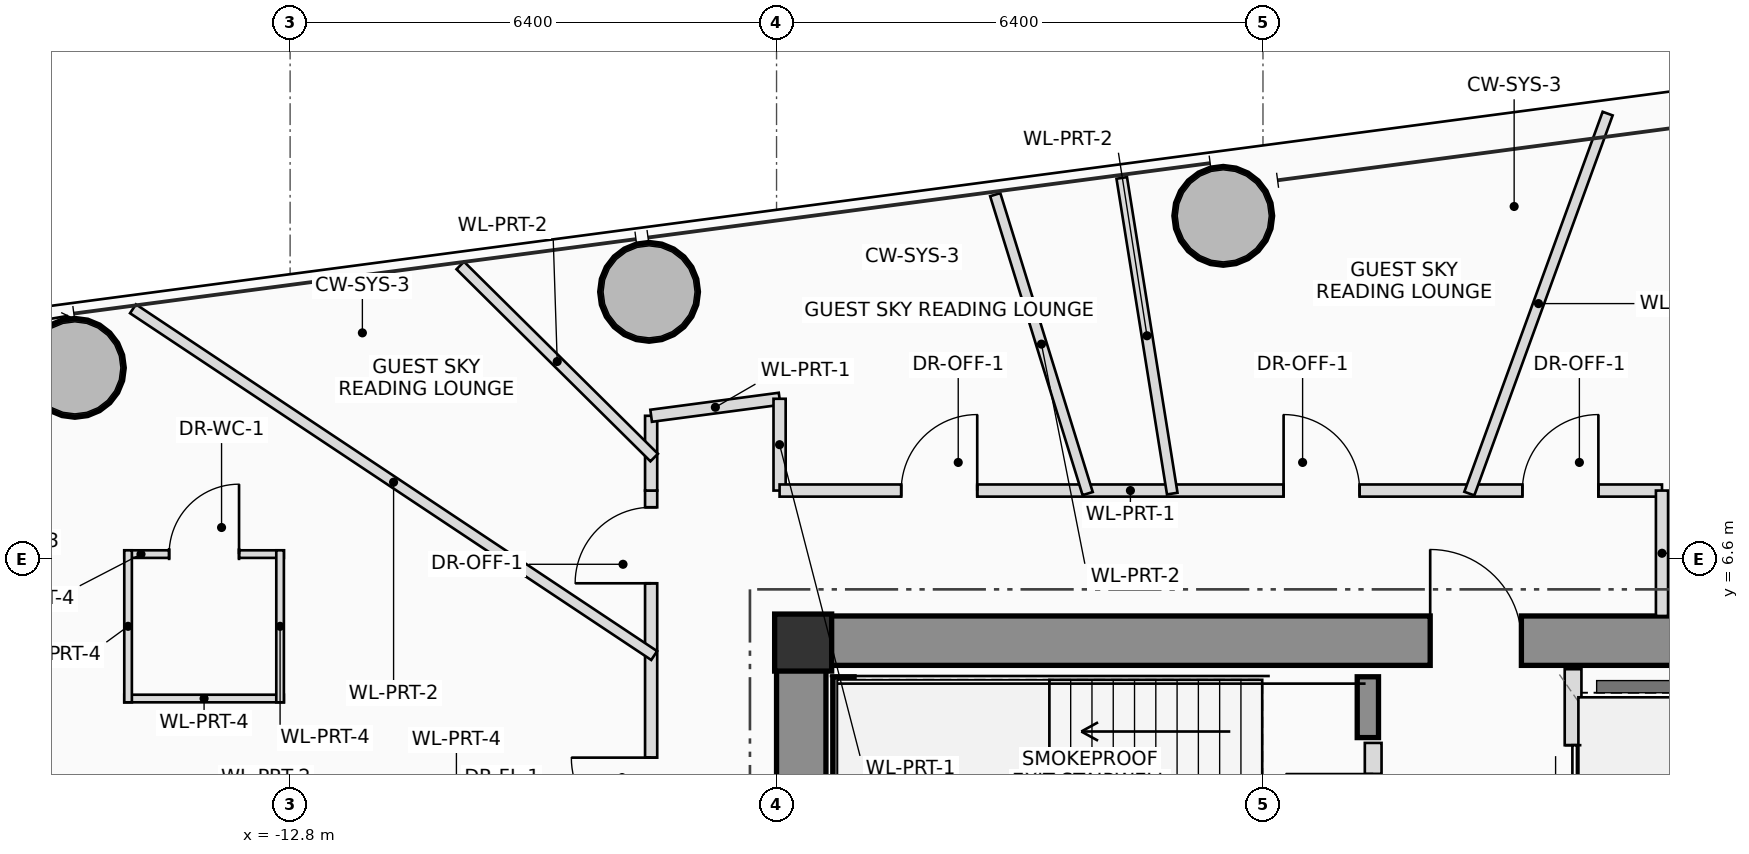
"""IFC4 building model, lengths in metres.
Left out: names, types, materials, properties, quantities, classifications, styles, units other than length and angle.
Written with IfcOpenShell. Run it as: python <this file> out.ifc"""

import sys

from ifc_helpers import new_model, si_unit, direction, frame, frame_2d, origin, origin_2d, place, context, subcontext, project, spatial, rectangle, hollow_circle, extrude, source, transform, mapped, element, fill, save


model = new_model("IFC4")
c1 = context("Model", 3, precision=1e-05, world=origin(), true_north=direction((0.0, 1.0)))
c2 = subcontext(c1, "Body", "Model", "MODEL_VIEW")
j1 = project(units=[si_unit("LENGTHUNIT", "METRE"), si_unit("PLANEANGLEUNIT", "RADIAN")], contexts=[c1])
p1 = place(None, origin())
s1 = spatial("IfcSite", under=j1, at=p1, CompositionType="ELEMENT")
p2 = place(p1, origin())
s2 = spatial("IfcBuilding", under=s1, at=p2, CompositionType="ELEMENT")
p3 = place(p2, frame((0.0, 0.0, 165.65)))
s3 = spatial("IfcBuildingStorey", under=s2, at=p3, CompositionType="ELEMENT", Elevation=165.65)
m1 = source(origin(), c2, "Body", "SweptSolid", [
    extrude(rectangle(XDim=0.75, YDim=0.75, at=origin_2d()), origin(), (0.0, 0.0, 1.0), 3.45),
])
p4 = place(p3, frame((-6.05, 5.5, 0.0), z_axis=(0.0, 0.0, 1.0), x_axis=(1.0, 0.0, 0.0)))
e1 = element("IfcColumn", 1, at=p4, inside=s3, PredefinedType="COLUMN", context=c2, shape_type="MappedRepresentation", body=[
    mapped(m1, transform((0.0, 0.0, 0.0), scale=1.0)),
])
p5 = place(p3, frame((-6.4, 5.525, 0.0), z_axis=(0.0, 0.0, 1.0), x_axis=(1.0, 0.0, 0.0)))
e2 = element("IfcWall", 2, at=p5, inside=s3, PredefinedType="SHEAR", context=c2, shape_type="SweptSolid", body=[
    extrude(rectangle(XDim=12.8, YDim=0.65, at=frame_2d((6.4, 0.0))), origin(), (0.0, 0.0, 1.0), 3.45),
])
p6 = place(p5, frame((8.6, 0.0, 0.0)))
e3 = element("IfcOpeningElement", 3, at=p6, cuts=e2, PredefinedType="OPENING", context=c2, shape_type="SweptSolid", body=[
    extrude(rectangle(XDim=1.2, YDim=2.2, at=frame_2d((0.6, 1.1))), frame((0.0, 0.335, 0.0), z_axis=(0.0, -1.0, 0.0), x_axis=(1.0, 0.0, 0.0)), (0.0, 0.0, 1.0), 0.67),
])
p7 = place(p3, frame((-6.075, 1.75, 0.0), z_axis=(0.0, 0.0, 1.0), x_axis=(0.0, 1.0, 0.0)))
e4 = element("IfcWall", 4, at=p7, inside=s3, PredefinedType="SHEAR", context=c2, shape_type="SweptSolid", body=[
    extrude(rectangle(XDim=3.45, YDim=0.65, at=frame_2d((1.725, 0.0))), origin(), (0.0, 0.0, 1.0), 3.45),
])
p8 = place(p3, frame((-5.52, 2.3, 0.0), z_axis=(0.0, 0.0, 1.0), x_axis=(0.0, 1.0, 0.0)))
e5 = element("IfcWall", 5, at=p8, inside=s3, PredefinedType="SHEAR", context=c2, shape_type="SweptSolid", body=[
    extrude(rectangle(XDim=2.75, YDim=0.28, at=frame_2d((1.375, 0.0))), origin(), (0.0, 0.0, 1.0), 3.45),
])
p9 = place(p3, frame((1.38, 4.25, 0.0), z_axis=(0.0, 0.0, 1.0), x_axis=(0.0, 1.0, 0.0)))
e6 = element("IfcWall", 6, at=p9, inside=s3, PredefinedType="SHEAR", context=c2, shape_type="SweptSolid", body=[
    extrude(rectangle(XDim=0.8, YDim=0.28, at=frame_2d((0.4, 0.0))), origin(), (0.0, 0.0, 1.0), 3.45),
])
m2 = source(origin(), c2, "Body", "SweptSolid", [
    extrude(hollow_circle(Radius=0.65, WallThickness=0.045, at=origin_2d()), origin(), (0.0, 0.0, 1.0), 3.45),
])
for number, where, z_axis, x_axis in (
    (7, (-0.522, 11.114, 0.0), (0.0, 0.0, 1.0), (1.0, 0.0, 0.0)),
    (8, (-8.077, 10.114, 0.0), (0.0, 0.0, 1.0), (1.0, 0.0, 0.0)),
    (9, (-15.632, 9.114, 0.0), (0.0, 0.0, 1.0), (1.0, 0.0, 0.0)),
):
    element("IfcColumn", number, at=place(p3, frame(where, z_axis=z_axis, x_axis=x_axis)), inside=s3, PredefinedType="COLUMN", context=c2, shape_type="MappedRepresentation", body=[
        mapped(m2, transform((0.0, 0.0, 0.0), scale=1.0)),
    ])
p10 = place(p3, frame((1.45, 2.2, 0.0), z_axis=(0.0, 0.0, 1.0), x_axis=(0.0, 1.0, 0.0)))
e10 = element("IfcWall", 10, at=p10, inside=s3, PredefinedType="PLUMBINGWALL", context=c2, shape_type="SweptSolid", body=[
    extrude(rectangle(XDim=1.98, YDim=0.22, at=frame_2d((0.99, 0.0))), origin(), (0.0, 0.0, 1.0), 3.25),
])
p11 = place(p10, frame((0.42, 0.0, 0.0)))
e11 = element("IfcOpeningElement", 11, at=p11, cuts=e10, PredefinedType="OPENING", context=c2, shape_type="SweptSolid", body=[
    extrude(rectangle(XDim=1.15, YDim=2.15, at=frame_2d((0.575, 1.075))), frame((0.0, 0.12, 0.0), z_axis=(0.0, -1.0, 0.0), x_axis=(1.0, 0.0, 0.0)), (0.0, 0.0, 1.0), 0.24),
])
p12 = place(p3, frame((4.08, 2.2, 0.0), z_axis=(0.0, 0.0, 1.0), x_axis=(0.0, 1.0, 0.0)))
e12 = element("IfcWall", 12, at=p12, inside=s3, PredefinedType="PLUMBINGWALL", context=c2, shape_type="SweptSolid", body=[
    extrude(rectangle(XDim=2.95, YDim=0.22, at=frame_2d((1.475, 0.0))), origin(), (0.0, 0.0, 1.0), 3.25),
])
p13 = place(p12, frame((0.75, 0.0, 0.0)))
e13 = element("IfcOpeningElement", 13, at=p13, cuts=e12, PredefinedType="OPENING", context=c2, shape_type="SweptSolid", body=[
    extrude(rectangle(XDim=1.2, YDim=2.25, at=frame_2d((0.6, 1.125))), frame((0.0, 0.12, 0.0), z_axis=(0.0, -1.0, 0.0), x_axis=(1.0, 0.0, 0.0)), (0.0, 0.0, 1.0), 0.24),
])
p14 = place(p3, frame((-14.982, 6.664, 0.0), z_axis=(0.0, 0.0, 1.0), x_axis=(1.0, 0.0, 0.0)))
e14 = element("IfcWall", 14, at=p14, inside=s3, PredefinedType="PARTITIONING", context=c2, shape_type="SweptSolid", body=[
    extrude(rectangle(XDim=2.1, YDim=0.1, at=frame_2d((1.05, 0.0))), origin(), (0.0, 0.0, 1.0), 2.905),
])
p15 = place(p14, frame((0.59, 0.0, 0.0)))
e15 = element("IfcOpeningElement", 15, at=p15, cuts=e14, PredefinedType="OPENING", context=c2, shape_type="SweptSolid", body=[
    extrude(rectangle(XDim=0.92, YDim=2.1, at=frame_2d((0.46, 1.05))), frame((0.0, 0.06, 0.0), z_axis=(0.0, -1.0, 0.0), x_axis=(1.0, 0.0, 0.0)), (0.0, 0.0, 1.0), 0.12),
])
p16 = place(p3, frame((-12.882, 4.764, 0.0), z_axis=(0.0, 0.0, 1.0), x_axis=(-1.0, 0.0, 0.0)))
e16 = element("IfcWall", 16, at=p16, inside=s3, PredefinedType="PARTITIONING", context=c2, shape_type="SweptSolid", body=[
    extrude(rectangle(XDim=2.1, YDim=0.1, at=frame_2d((1.05, 0.0))), origin(), (0.0, 0.0, 1.0), 2.605),
])
p17 = place(p3, frame((-12.932, 6.714, 0.0), z_axis=(0.0, 0.0, 1.0), x_axis=(0.0, -1.0, 0.0)))
e17 = element("IfcWall", 17, at=p17, inside=s3, PredefinedType="PARTITIONING", context=c2, shape_type="SweptSolid", body=[
    extrude(rectangle(XDim=2.0, YDim=0.1, at=frame_2d((1.0, 0.0))), origin(), (0.0, 0.0, 1.0), 2.605),
])
p18 = place(p3, frame((-14.932, 4.714, 0.0), z_axis=(0.0, 0.0, 1.0), x_axis=(0.0, 1.0, 0.0)))
e18 = element("IfcWall", 18, at=p18, inside=s3, PredefinedType="PARTITIONING", context=c2, shape_type="SweptSolid", body=[
    extrude(rectangle(XDim=2.0, YDim=0.1, at=frame_2d((1.0, 0.0))), origin(), (0.0, 0.0, 1.0), 3.25),
])
p19 = place(p3, frame((-8.05, -7.5, 0.0), z_axis=(0.0, 0.0, 1.0), x_axis=(0.0, 1.0, 0.0)))
e19 = element("IfcWall", 19, at=p19, inside=s3, PredefinedType="PARTITIONING", context=c2, shape_type="SweptSolid", body=[
    extrude(rectangle(XDim=15.0, YDim=0.16, at=frame_2d((7.5, 0.0))), origin(), (0.0, 0.0, 1.0), 2.605),
])
p20 = place(p19, frame((6.753, 0.0, 0.0)))
e20 = element("IfcOpeningElement", 20, at=p20, cuts=e19, PredefinedType="OPENING", context=c2, shape_type="SweptSolid", body=[
    extrude(rectangle(XDim=1.05, YDim=2.2, at=frame_2d((0.525, 1.1))), frame((0.0, 0.09, 0.0), z_axis=(0.0, -1.0, 0.0), x_axis=(1.0, 0.0, 0.0)), (0.0, 0.0, 1.0), 0.18),
])
p21 = place(p19, frame((10.436, 0.0, 0.0)))
e21 = element("IfcOpeningElement", 21, at=p21, cuts=e19, PredefinedType="OPENING", context=c2, shape_type="SweptSolid", body=[
    extrude(rectangle(XDim=1.05, YDim=2.2, at=frame_2d((0.525, 1.1))), frame((0.0, 0.09, 0.0), z_axis=(0.0, -1.0, 0.0), x_axis=(1.0, 0.0, 0.0)), (0.0, 0.0, 1.0), 0.18),
])
p22 = place(p19, frame((13.78, 0.0, 0.0)))
e22 = element("IfcOpeningElement", 22, at=p22, cuts=e19, PredefinedType="OPENING", context=c2, shape_type="SweptSolid", body=[
    extrude(rectangle(XDim=1.0, YDim=2.25, at=frame_2d((0.5, 1.125))), frame((0.0, 0.09, 0.0), z_axis=(0.0, -1.0, 0.0), x_axis=(1.0, 0.0, 0.0)), (0.0, 0.0, 1.0), 0.18),
])
p23 = place(p3, frame((-8.05, 7.5, 0.0), z_axis=(0.0, 0.0, 1.0), x_axis=(0.0, 1.0, 0.0)))
e23 = element("IfcWall", 23, at=p23, inside=s3, PredefinedType="PARTITIONING", context=c2, shape_type="SweptSolid", body=[
    extrude(rectangle(XDim=0.984, YDim=0.16, at=frame_2d((0.492, 0.0))), origin(), (0.0, 0.0, 1.0), 2.805),
])
p24 = place(p3, frame((-8.05, 8.484, 0.0), z_axis=(0.0, 0.0, 1.0), x_axis=(0.991338869543, 0.131328769629, 0.0)))
e24 = element("IfcWall", 24, at=p24, inside=s3, PredefinedType="PARTITIONING", context=c2, shape_type="SweptSolid", body=[
    extrude(rectangle(XDim=1.705, YDim=0.16, at=frame_2d((0.852, 0.0))), origin(), (0.0, 0.0, 1.0), 2.605),
])
p25 = place(p3, frame((-6.36, 8.708, 0.0), z_axis=(0.0, 0.0, 1.0), x_axis=(0.0, -1.0, 0.0)))
e25 = element("IfcWall", 25, at=p25, inside=s3, PredefinedType="PARTITIONING", context=c2, shape_type="SweptSolid", body=[
    extrude(rectangle(XDim=1.208, YDim=0.16, at=frame_2d((0.604, 0.0))), origin(), (0.0, 0.0, 1.0), 2.805),
])
p26 = place(p3, frame((-6.36, 7.5, 0.0), z_axis=(0.0, 0.0, 1.0), x_axis=(1.0, 0.0, 0.0)))
e26 = element("IfcWall", 26, at=p26, inside=s3, PredefinedType="PARTITIONING", context=c2, shape_type="SweptSolid", body=[
    extrude(rectangle(XDim=11.61, YDim=0.16, at=frame_2d((5.805, 0.0))), origin(), (0.0, 0.0, 1.0), 2.605),
])
p27 = place(p26, frame((1.6, 0.0, 0.0)))
e27 = element("IfcOpeningElement", 27, at=p27, cuts=e26, PredefinedType="OPENING", context=c2, shape_type="SweptSolid", body=[
    extrude(rectangle(XDim=1.0, YDim=2.25, at=frame_2d((0.5, 1.125))), frame((0.0, 0.09, 0.0), z_axis=(0.0, -1.0, 0.0), x_axis=(1.0, 0.0, 0.0)), (0.0, 0.0, 1.0), 0.18),
])
p28 = place(p26, frame((6.631, 0.0, 0.0)))
e28 = element("IfcOpeningElement", 28, at=p28, cuts=e26, PredefinedType="OPENING", context=c2, shape_type="SweptSolid", body=[
    extrude(rectangle(XDim=1.0, YDim=2.25, at=frame_2d((0.5, 1.125))), frame((0.0, 0.09, 0.0), z_axis=(0.0, -1.0, 0.0), x_axis=(1.0, 0.0, 0.0)), (0.0, 0.0, 1.0), 0.18),
])
p29 = place(p26, frame((9.773, 0.0, 0.0)))
e29 = element("IfcOpeningElement", 29, at=p29, cuts=e26, PredefinedType="OPENING", context=c2, shape_type="SweptSolid", body=[
    extrude(rectangle(XDim=1.0, YDim=2.25, at=frame_2d((0.5, 1.125))), frame((0.0, 0.09, 0.0), z_axis=(0.0, -1.0, 0.0), x_axis=(1.0, 0.0, 0.0)), (0.0, 0.0, 1.0), 0.18),
])
p30 = place(p3, frame((5.25, 7.5, 0.0), z_axis=(0.0, 0.0, 1.0), x_axis=(0.0, -1.0, 0.0)))
e30 = element("IfcWall", 30, at=p30, inside=s3, PredefinedType="PARTITIONING", context=c2, shape_type="SweptSolid", body=[
    extrude(rectangle(XDim=1.65, YDim=0.16, at=frame_2d((0.825, 0.0))), origin(), (0.0, 0.0, 1.0), 3.25),
])
p31 = place(p3, frame((2.715, 7.46, 0.0), z_axis=(0.0, 0.0, 1.0), x_axis=(0.342045165819, 0.939683512966, 0.0)))
e31 = element("IfcWall", 31, at=p31, inside=s3, PredefinedType="PARTITIONING", context=c2, shape_type="SweptSolid", body=[
    extrude(rectangle(XDim=5.32, YDim=0.14, at=frame_2d((2.66, 0.0))), origin(), (0.0, 0.0, 1.0), 2.605),
])
p32 = place(p3, frame((-1.194, 7.46, 0.0), z_axis=(0.0, 0.0, 1.0), x_axis=(-0.157995028697, 0.987439907492, 0.0)))
e32 = element("IfcWall", 32, at=p32, inside=s3, PredefinedType="PARTITIONING", context=c2, shape_type="SweptSolid", body=[
    extrude(rectangle(XDim=4.206, YDim=0.14, at=frame_2d((2.103, 0.0))), origin(), (0.0, 0.0, 1.0), 2.605),
])
p33 = place(p3, frame((-2.307, 7.46, 0.0), z_axis=(0.0, 0.0, 1.0), x_axis=(-0.295406664686, 0.955371604382, 0.0)))
e33 = element("IfcWall", 33, at=p33, inside=s3, PredefinedType="PARTITIONING", context=c2, shape_type="SweptSolid", body=[
    extrude(rectangle(XDim=4.117, YDim=0.14, at=frame_2d((2.058, 0.0))), origin(), (0.0, 0.0, 1.0), 2.605),
])
p34 = place(p3, frame((-8.01, 7.934, 0.0), z_axis=(0.0, 0.0, 1.0), x_axis=(-0.710464129117, 0.703733416315, 0.0)))
e34 = element("IfcWall", 34, at=p34, inside=s3, PredefinedType="PARTITIONING", context=c2, shape_type="SweptSolid", body=[
    extrude(rectangle(XDim=3.591, YDim=0.14, at=frame_2d((1.795, 0.0))), origin(), (0.0, 0.0, 1.0), 2.765),
])
p35 = place(p3, frame((-8.01, 5.329, 0.0), z_axis=(0.0, 0.0, 1.0), x_axis=(-0.832565256492, 0.553926975044, 0.0)))
e35 = element("IfcWall", 35, at=p35, inside=s3, PredefinedType="PARTITIONING", context=c2, shape_type="SweptSolid", body=[
    extrude(rectangle(XDim=8.236, YDim=0.14, at=frame_2d((4.118, 0.0))), origin(), (0.0, 0.0, 1.0), 2.605),
])
p36 = place(p6, origin())
e36 = element("IfcDoor", 36, at=p36, inside=s3, OperationType="SINGLE_SWING_LEFT", PredefinedType="DOOR", context=c2, shape_type="SweptSolid", body=[
    extrude(rectangle(XDim=1.2, YDim=2.2, at=frame_2d((0.6, 1.1))), frame((0.0, 0.025, 0.0), z_axis=(0.0, -1.0, 0.0), x_axis=(1.0, 0.0, 0.0)), (0.0, 0.0, 1.0), 0.05),
])
fill(e3, e36)
p37 = place(p11, origin())
e37 = element("IfcDoor", 37, at=p37, inside=s3, OperationType="SINGLE_SWING_RIGHT", PredefinedType="DOOR", context=c2, shape_type="SweptSolid", body=[
    extrude(rectangle(XDim=1.15, YDim=2.15, at=frame_2d((0.575, 1.075))), frame((0.0, 0.025, 0.0), z_axis=(0.0, -1.0, 0.0), x_axis=(1.0, 0.0, 0.0)), (0.0, 0.0, 1.0), 0.05),
])
fill(e11, e37)
p38 = place(p13, origin())
e38 = element("IfcDoor", 38, at=p38, inside=s3, OperationType="DOUBLE_DOOR_SLIDING", PredefinedType="DOOR", context=c2, shape_type="SweptSolid", body=[
    extrude(rectangle(XDim=1.2, YDim=2.25, at=frame_2d((0.6, 1.125))), frame((0.0, 0.025, 0.0), z_axis=(0.0, -1.0, 0.0), x_axis=(1.0, 0.0, 0.0)), (0.0, 0.0, 1.0), 0.05),
])
fill(e13, e38)
p39 = place(p15, origin())
e39 = element("IfcDoor", 39, at=p39, inside=s3, OperationType="SINGLE_SWING_RIGHT", PredefinedType="DOOR", context=c2, shape_type="SweptSolid", body=[
    extrude(rectangle(XDim=0.92, YDim=2.1, at=frame_2d((0.46, 1.05))), frame((0.0, 0.025, 0.0), z_axis=(0.0, -1.0, 0.0), x_axis=(1.0, 0.0, 0.0)), (0.0, 0.0, 1.0), 0.05),
])
fill(e15, e39)
p40 = place(p21, origin())
e40 = element("IfcDoor", 40, at=p40, inside=s3, OperationType="SINGLE_SWING_RIGHT", PredefinedType="DOOR", context=c2, shape_type="SweptSolid", body=[
    extrude(rectangle(XDim=1.05, YDim=2.2, at=frame_2d((0.525, 1.1))), frame((0.0, 0.025, 0.0), z_axis=(0.0, -1.0, 0.0), x_axis=(1.0, 0.0, 0.0)), (0.0, 0.0, 1.0), 0.05),
])
fill(e21, e40)
p41 = place(p22, origin())
e41 = element("IfcDoor", 41, at=p41, inside=s3, OperationType="SINGLE_SWING_LEFT", PredefinedType="DOOR", context=c2, shape_type="SweptSolid", body=[
    extrude(rectangle(XDim=1.0, YDim=2.25, at=frame_2d((0.5, 1.125))), frame((0.0, 0.025, 0.0), z_axis=(0.0, -1.0, 0.0), x_axis=(1.0, 0.0, 0.0)), (0.0, 0.0, 1.0), 0.05),
])
fill(e22, e41)
p42 = place(p27, origin())
e42 = element("IfcDoor", 42, at=p42, inside=s3, OperationType="SINGLE_SWING_RIGHT", PredefinedType="DOOR", context=c2, shape_type="SweptSolid", body=[
    extrude(rectangle(XDim=1.0, YDim=2.25, at=frame_2d((0.5, 1.125))), frame((0.0, 0.025, 0.0), z_axis=(0.0, -1.0, 0.0), x_axis=(1.0, 0.0, 0.0)), (0.0, 0.0, 1.0), 0.05),
])
fill(e27, e42)
p43 = place(p28, origin())
e43 = element("IfcDoor", 43, at=p43, inside=s3, OperationType="SINGLE_SWING_LEFT", PredefinedType="DOOR", context=c2, shape_type="SweptSolid", body=[
    extrude(rectangle(XDim=1.0, YDim=2.25, at=frame_2d((0.5, 1.125))), frame((0.0, 0.025, 0.0), z_axis=(0.0, -1.0, 0.0), x_axis=(1.0, 0.0, 0.0)), (0.0, 0.0, 1.0), 0.05),
])
fill(e28, e43)
p44 = place(p29, origin())
e44 = element("IfcDoor", 44, at=p44, inside=s3, OperationType="SINGLE_SWING_RIGHT", PredefinedType="DOOR", context=c2, shape_type="SweptSolid", body=[
    extrude(rectangle(XDim=1.0, YDim=2.25, at=frame_2d((0.5, 1.125))), frame((0.0, 0.025, 0.0), z_axis=(0.0, -1.0, 0.0), x_axis=(1.0, 0.0, 0.0)), (0.0, 0.0, 1.0), 0.05),
])
fill(e29, e44)
save(model, sys.argv[1])
